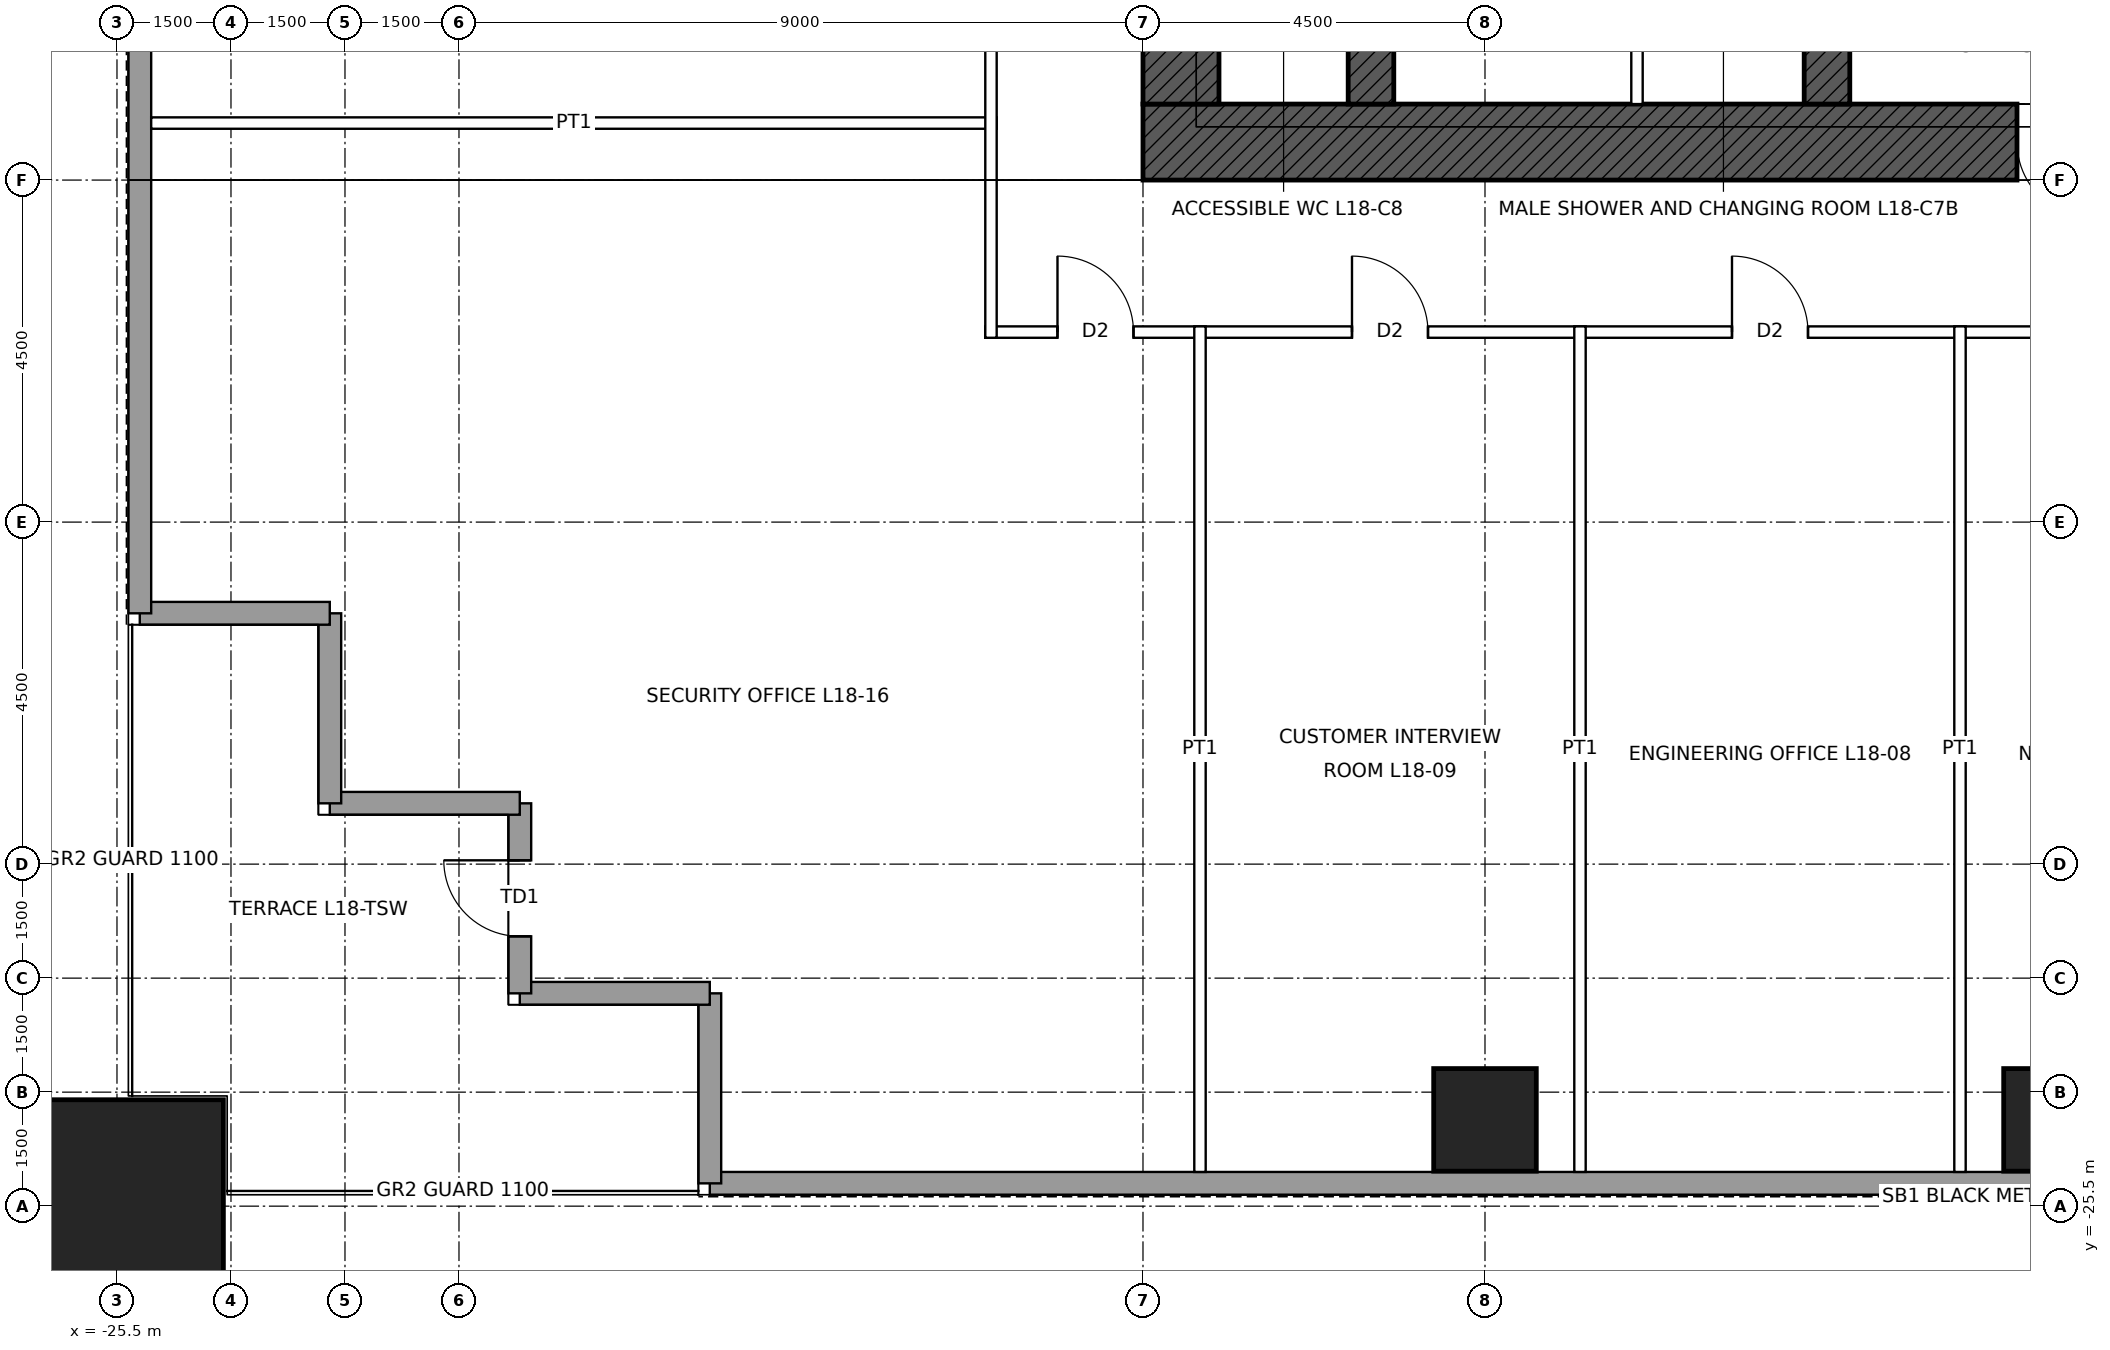
"""IFC4 building model, lengths in metres.
Left out: names, types, materials, properties, quantities, classifications, styles, units other than length and angle.
Written with IfcOpenShell. Run it as: python <this file> out.ifc"""

import sys

from ifc_helpers import new_model, si_unit, direction, frame, frame_2d, origin, origin_2d, place, context, subcontext, project, spatial, rectangle, hollow_rectangle, extrude, element, fill, save


model = new_model("IFC4")
c1 = context("Model", 3, precision=1e-05, world=origin(), true_north=direction((0.0, 1.0)))
c2 = subcontext(c1, "Body", "Model", "MODEL_VIEW")
j1 = project(units=[si_unit("LENGTHUNIT", "METRE"), si_unit("PLANEANGLEUNIT", "RADIAN")], contexts=[c1])
p1 = place(None, origin())
s1 = spatial("IfcSite", under=j1, at=p1, CompositionType="ELEMENT")
p2 = place(p1, origin())
s2 = spatial("IfcBuilding", under=s1, at=p2, CompositionType="ELEMENT")
p3 = place(p2, frame((0.0, 0.0, 93.4)))
s3 = spatial("IfcBuildingStorey", under=s2, at=p3, CompositionType="ELEMENT", Elevation=93.4)
p4 = place(p3, frame((-25.5, -25.5, 0.0), z_axis=(0.0, 0.0, 1.0), x_axis=(1.0, 0.0, 0.0)))
e1 = element("IfcColumn", 1, at=p4, inside=s3, PredefinedType="COLUMN", context=c2, shape_type="SweptSolid", body=[
    extrude(hollow_rectangle(XDim=2.8, YDim=2.8, WallThickness=0.14, at=origin_2d()), origin(), (0.0, 0.0, 1.0), 5.0),
])
for number, where, z_axis, x_axis in (
    (2, (0.0, -24.365, 0.0), (0.0, 0.0, 1.0), (1.0, 0.0, 0.0)),
    (3, (-7.5, -24.365, 0.0), (0.0, 0.0, 1.0), (1.0, 0.0, 0.0)),
):
    element("IfcColumn", number, at=place(p3, frame(where, z_axis=z_axis, x_axis=x_axis)), inside=s3, PredefinedType="COLUMN", context=c2, shape_type="SweptSolid", body=[
        extrude(hollow_rectangle(XDim=1.35, YDim=1.35, WallThickness=0.1, at=origin_2d()), origin(), (0.0, 0.0, 1.0), 5.0),
    ])
p5 = place(p3, frame((12.0, -11.5, 0.0), z_axis=(0.0, 0.0, 1.0), x_axis=(-1.0, 0.0, 0.0)))
e4 = element("IfcWall", 4, at=p5, inside=s3, PredefinedType="SHEAR", context=c2, shape_type="SweptSolid", body=[
    extrude(rectangle(XDim=24.0, YDim=1.0, at=frame_2d((12.0, 0.0))), origin(), (0.0, 0.0, 1.0), 5.0),
])
p6 = place(p5, frame((11.5, 0.0, 0.0)))
e5 = element("IfcOpeningElement", 5, at=p6, cuts=e4, PredefinedType="OPENING", context=c2, shape_type="SweptSolid", body=[
    extrude(rectangle(XDim=1.0, YDim=2.1, at=frame_2d((0.5, 1.05))), frame((0.0, 0.51, 0.0), z_axis=(0.0, -1.0, 0.0), x_axis=(1.0, 0.0, 0.0)), (0.0, 0.0, 1.0), 1.02),
])
p7 = place(p5, frame((1.0, 0.0, 0.0)))
e6 = element("IfcOpeningElement", 6, at=p7, cuts=e4, PredefinedType="OPENING", context=c2, shape_type="SweptSolid", body=[
    extrude(rectangle(XDim=1.0, YDim=2.4, at=frame_2d((0.5, 1.2))), frame((0.0, 0.51, 0.0), z_axis=(0.0, -1.0, 0.0), x_axis=(1.0, 0.0, 0.0)), (0.0, 0.0, 1.0), 1.02),
])
p8 = place(p3, frame((-11.5, -11.0, 0.0), z_axis=(0.0, 0.0, 1.0), x_axis=(0.0, 1.0, 0.0)))
e7 = element("IfcWall", 7, at=p8, inside=s3, PredefinedType="SHEAR", context=c2, shape_type="SweptSolid", body=[
    extrude(rectangle(XDim=22.0, YDim=1.0, at=frame_2d((11.0, 0.0))), origin(), (0.0, 0.0, 1.0), 5.0),
])
p9 = place(p8, frame((10.5, 0.0, 0.0)))
e8 = element("IfcOpeningElement", 8, at=p9, cuts=e7, PredefinedType="OPENING", context=c2, shape_type="SweptSolid", body=[
    extrude(rectangle(XDim=1.0, YDim=2.4, at=frame_2d((0.5, 1.2))), frame((0.0, 0.51, 0.0), z_axis=(0.0, -1.0, 0.0), x_axis=(1.0, 0.0, 0.0)), (0.0, 0.0, 1.0), 1.02),
])
p10 = place(p3, frame((-9.0, -11.0, 0.0), z_axis=(0.0, 0.0, 1.0), x_axis=(0.0, 1.0, 0.0)))
e9 = element("IfcWall", 9, at=p10, inside=s3, PredefinedType="SHEAR", context=c2, shape_type="SweptSolid", body=[
    extrude(rectangle(XDim=6.5, YDim=0.6, at=frame_2d((3.25, 0.0))), origin(), (0.0, 0.0, 1.0), 5.0),
])
p11 = place(p10, frame((4.25, 0.0, 0.0)))
e10 = element("IfcOpeningElement", 10, at=p11, cuts=e9, PredefinedType="OPENING", context=c2, shape_type="SweptSolid", body=[
    extrude(rectangle(XDim=1.0, YDim=2.1, at=frame_2d((0.5, 1.05))), frame((0.0, 0.31, 0.0), z_axis=(0.0, -1.0, 0.0), x_axis=(1.0, 0.0, 0.0)), (0.0, 0.0, 1.0), 0.62),
])
p12 = place(p3, frame((-3.0, -11.0, 0.0), z_axis=(0.0, 0.0, 1.0), x_axis=(0.0, 1.0, 0.0)))
e11 = element("IfcWall", 11, at=p12, inside=s3, PredefinedType="SHEAR", context=c2, shape_type="SweptSolid", body=[
    extrude(rectangle(XDim=6.5, YDim=0.6, at=frame_2d((3.25, 0.0))), origin(), (0.0, 0.0, 1.0), 5.0),
])
p13 = place(p3, frame((17.7, -25.2, 0.0), z_axis=(0.0, 0.0, 1.0), x_axis=(-1.0, 0.0, 0.0)))
e12 = element("IfcWall", 12, at=p13, inside=s3, PredefinedType="SOLIDWALL", context=c2, shape_type="SweptSolid", body=[
    extrude(rectangle(XDim=35.4, YDim=0.3, at=frame_2d((17.7, 0.0))), origin(), (0.0, 0.0, 1.0), 4.75),
])
for number, where, z_axis, x_axis in (
    (13, (-17.7, -25.2, 0.0), (0.0, 0.0, 1.0), (0.0, 1.0, 0.0)),
    (14, (-17.7, -22.7, 0.0), (0.0, 0.0, 1.0), (-1.0, 0.0, 0.0)),
):
    element("IfcWall", number, at=place(p3, frame(where, z_axis=z_axis, x_axis=x_axis)), inside=s3, PredefinedType="SOLIDWALL", context=c2, shape_type="SweptSolid", body=[
        extrude(rectangle(XDim=2.5, YDim=0.3, at=frame_2d((1.25, 0.0))), origin(), (0.0, 0.0, 1.0), 4.75),
    ])
p14 = place(p3, frame((-20.2, -22.7, 0.0), z_axis=(0.0, 0.0, 1.0), x_axis=(0.0, 1.0, 0.0)))
e15 = element("IfcWall", 15, at=p14, inside=s3, PredefinedType="SOLIDWALL", context=c2, shape_type="SweptSolid", body=[
    extrude(rectangle(XDim=2.5, YDim=0.3, at=frame_2d((1.25, 0.0))), origin(), (0.0, 0.0, 1.0), 4.75),
])
p15 = place(p14, frame((0.75, 0.0, 0.0)))
e16 = element("IfcOpeningElement", 16, at=p15, cuts=e15, PredefinedType="OPENING", context=c2, shape_type="SweptSolid", body=[
    extrude(rectangle(XDim=1.0, YDim=2.4, at=frame_2d((0.5, 1.2))), frame((0.0, 0.16, 0.0), z_axis=(0.0, -1.0, 0.0), x_axis=(1.0, 0.0, 0.0)), (0.0, 0.0, 1.0), 0.32),
])
for number, where, z_axis, x_axis in (
    (17, (-20.2, -20.2, 0.0), (0.0, 0.0, 1.0), (-1.0, 0.0, 0.0)),
    (18, (-22.7, -20.2, 0.0), (0.0, 0.0, 1.0), (0.0, 1.0, 0.0)),
    (19, (-22.7, -17.7, 0.0), (0.0, 0.0, 1.0), (-1.0, 0.0, 0.0)),
):
    element("IfcWall", number, at=place(p3, frame(where, z_axis=z_axis, x_axis=x_axis)), inside=s3, PredefinedType="SOLIDWALL", context=c2, shape_type="SweptSolid", body=[
        extrude(rectangle(XDim=2.5, YDim=0.3, at=frame_2d((1.25, 0.0))), origin(), (0.0, 0.0, 1.0), 4.75),
    ])
p16 = place(p3, frame((-25.2, -17.7, 0.0), z_axis=(0.0, 0.0, 1.0), x_axis=(0.0, 1.0, 0.0)))
e20 = element("IfcWall", 20, at=p16, inside=s3, PredefinedType="SOLIDWALL", context=c2, shape_type="SweptSolid", body=[
    extrude(rectangle(XDim=35.4, YDim=0.3, at=frame_2d((17.7, 0.0))), origin(), (0.0, 0.0, 1.0), 4.75),
])
p17 = place(p3, frame((-14.075, -14.0, 0.0), z_axis=(0.0, 0.0, 1.0), x_axis=(1.0, 0.0, 0.0)))
e21 = element("IfcWall", 21, at=p17, inside=s3, PredefinedType="PARTITIONING", context=c2, shape_type="SweptSolid", body=[
    extrude(rectangle(XDim=28.15, YDim=0.15, at=frame_2d((14.075, 0.0))), origin(), (0.0, 0.0, 1.0), 4.75),
])
p18 = place(p17, frame((21.3, 0.0, 0.0)))
e22 = element("IfcOpeningElement", 22, at=p18, cuts=e21, PredefinedType="OPENING", context=c2, shape_type="SweptSolid", body=[
    extrude(rectangle(XDim=1.8, YDim=2.4, at=frame_2d((0.9, 1.2))), frame((0.0, 0.085, 0.0), z_axis=(0.0, -1.0, 0.0), x_axis=(1.0, 0.0, 0.0)), (0.0, 0.0, 1.0), 0.17),
])
p19 = place(p17, frame((15.05, 0.0, 0.0)))
e23 = element("IfcOpeningElement", 23, at=p19, cuts=e21, PredefinedType="OPENING", context=c2, shape_type="SweptSolid", body=[
    extrude(rectangle(XDim=1.8, YDim=2.4, at=frame_2d((0.9, 1.2))), frame((0.0, 0.085, 0.0), z_axis=(0.0, -1.0, 0.0), x_axis=(1.0, 0.0, 0.0)), (0.0, 0.0, 1.0), 0.17),
])
p20 = place(p17, frame((9.825, 0.0, 0.0)))
e24 = element("IfcOpeningElement", 24, at=p20, cuts=e21, PredefinedType="OPENING", context=c2, shape_type="SweptSolid", body=[
    extrude(rectangle(XDim=1.0, YDim=2.1, at=frame_2d((0.5, 1.05))), frame((0.0, 0.085, 0.0), z_axis=(0.0, -1.0, 0.0), x_axis=(1.0, 0.0, 0.0)), (0.0, 0.0, 1.0), 0.17),
])
p21 = place(p17, frame((4.825, 0.0, 0.0)))
e25 = element("IfcOpeningElement", 25, at=p21, cuts=e21, PredefinedType="OPENING", context=c2, shape_type="SweptSolid", body=[
    extrude(rectangle(XDim=1.0, YDim=2.1, at=frame_2d((0.5, 1.05))), frame((0.0, 0.085, 0.0), z_axis=(0.0, -1.0, 0.0), x_axis=(1.0, 0.0, 0.0)), (0.0, 0.0, 1.0), 0.17),
])
p22 = place(p17, frame((26.2, 0.0, 0.0)))
e26 = element("IfcOpeningElement", 26, at=p22, cuts=e21, PredefinedType="OPENING", context=c2, shape_type="SweptSolid", body=[
    extrude(rectangle(XDim=1.0, YDim=2.1, at=frame_2d((0.5, 1.05))), frame((0.0, 0.085, 0.0), z_axis=(0.0, -1.0, 0.0), x_axis=(1.0, 0.0, 0.0)), (0.0, 0.0, 1.0), 0.17),
])
p23 = place(p17, frame((0.95, 0.0, 0.0)))
e27 = element("IfcOpeningElement", 27, at=p23, cuts=e21, PredefinedType="OPENING", context=c2, shape_type="SweptSolid", body=[
    extrude(rectangle(XDim=1.0, YDim=2.1, at=frame_2d((0.5, 1.05))), frame((0.0, 0.085, 0.0), z_axis=(0.0, -1.0, 0.0), x_axis=(1.0, 0.0, 0.0)), (0.0, 0.0, 1.0), 0.17),
])
p24 = place(p3, frame((-25.05, -11.25, 0.0), z_axis=(0.0, 0.0, 1.0), x_axis=(1.0, 0.0, 0.0)))
e28 = element("IfcWall", 28, at=p24, inside=s3, PredefinedType="PARTITIONING", context=c2, shape_type="SweptSolid", body=[
    extrude(rectangle(XDim=11.125, YDim=0.15, at=frame_2d((5.562, 0.0))), origin(), (0.0, 0.0, 1.0), 3.823),
])
p25 = place(p3, frame((-14.0, -14.075, 0.0), z_axis=(0.0, 0.0, 1.0), x_axis=(0.0, 1.0, 0.0)))
e29 = element("IfcWall", 29, at=p25, inside=s3, PredefinedType="PARTITIONING", context=c2, shape_type="SweptSolid", body=[
    extrude(rectangle(XDim=28.15, YDim=0.15, at=frame_2d((14.075, 0.0))), origin(), (0.0, 0.0, 1.0), 4.75),
])
p26 = place(p25, frame((5.05, 0.0, 0.0)))
e30 = element("IfcOpeningElement", 30, at=p26, cuts=e29, PredefinedType="OPENING", context=c2, shape_type="SweptSolid", body=[
    extrude(rectangle(XDim=1.8, YDim=2.4, at=frame_2d((0.9, 1.2))), frame((0.0, 0.085, 0.0), z_axis=(0.0, -1.0, 0.0), x_axis=(1.0, 0.0, 0.0)), (0.0, 0.0, 1.0), 0.17),
])
p27 = place(p25, frame((10.45, 0.0, 0.0)))
e31 = element("IfcOpeningElement", 31, at=p27, cuts=e29, PredefinedType="OPENING", context=c2, shape_type="SweptSolid", body=[
    extrude(rectangle(XDim=1.0, YDim=2.1, at=frame_2d((0.5, 1.05))), frame((0.0, 0.085, 0.0), z_axis=(0.0, -1.0, 0.0), x_axis=(1.0, 0.0, 0.0)), (0.0, 0.0, 1.0), 0.17),
])
p28 = place(p25, frame((15.465, 0.0, 0.0)))
e32 = element("IfcOpeningElement", 32, at=p28, cuts=e29, PredefinedType="OPENING", context=c2, shape_type="SweptSolid", body=[
    extrude(rectangle(XDim=1.0, YDim=2.1, at=frame_2d((0.5, 1.05))), frame((0.0, 0.085, 0.0), z_axis=(0.0, -1.0, 0.0), x_axis=(1.0, 0.0, 0.0)), (0.0, 0.0, 1.0), 0.17),
])
p29 = place(p25, frame((21.075, 0.0, 0.0)))
e33 = element("IfcOpeningElement", 33, at=p29, cuts=e29, PredefinedType="OPENING", context=c2, shape_type="SweptSolid", body=[
    extrude(rectangle(XDim=1.0, YDim=2.1, at=frame_2d((0.5, 1.05))), frame((0.0, 0.085, 0.0), z_axis=(0.0, -1.0, 0.0), x_axis=(1.0, 0.0, 0.0)), (0.0, 0.0, 1.0), 0.17),
])
p30 = place(p3, frame((-11.25, -25.05, 0.0), z_axis=(0.0, 0.0, 1.0), x_axis=(0.0, 1.0, 0.0)))
e34 = element("IfcWall", 34, at=p30, inside=s3, PredefinedType="PARTITIONING", context=c2, shape_type="SweptSolid", body=[
    extrude(rectangle(XDim=11.125, YDim=0.15, at=frame_2d((5.562, 0.0))), origin(), (0.0, 0.0, 1.0), 3.823),
])
for number, where, z_axis, x_axis in (
    (35, (-6.25, -25.05, 0.0), (0.0, 0.0, 1.0), (0.0, 1.0, 0.0)),
    (36, (-1.25, -25.05, 0.0), (0.0, 0.0, 1.0), (0.0, 1.0, 0.0)),
):
    element("IfcWall", number, at=place(p3, frame(where, z_axis=z_axis, x_axis=x_axis)), inside=s3, PredefinedType="PARTITIONING", context=c2, shape_type="SweptSolid", body=[
        extrude(rectangle(XDim=11.125, YDim=0.15, at=frame_2d((5.562, 0.0))), origin(), (0.0, 0.0, 1.0), 4.75),
    ])
p31 = place(p3, frame((-5.5, -11.0, 0.0), z_axis=(0.0, 0.0, 1.0), x_axis=(0.0, 1.0, 0.0)))
e37 = element("IfcWall", 37, at=p31, inside=s3, PredefinedType="PARTITIONING", context=c2, shape_type="SweptSolid", body=[
    extrude(rectangle(XDim=6.2, YDim=0.15, at=frame_2d((3.1, 0.0))), origin(), (0.0, 0.0, 1.0), 4.75),
])
p32 = place(p31, frame((2.6, 0.0, 0.0)))
e38 = element("IfcOpeningElement", 38, at=p32, cuts=e37, PredefinedType="OPENING", context=c2, shape_type="SweptSolid", body=[
    extrude(rectangle(XDim=1.0, YDim=2.1, at=frame_2d((0.5, 1.05))), frame((0.0, 0.085, 0.0), z_axis=(0.0, -1.0, 0.0), x_axis=(1.0, 0.0, 0.0)), (0.0, 0.0, 1.0), 0.17),
])
p33 = place(p15, origin())
e39 = element("IfcDoor", 39, at=p33, inside=s3, OperationType="SINGLE_SWING_RIGHT", PredefinedType="DOOR", context=c2, shape_type="SweptSolid", body=[
    extrude(rectangle(XDim=1.0, YDim=2.4, at=frame_2d((0.5, 1.2))), frame((0.0, 0.025, 0.0), z_axis=(0.0, -1.0, 0.0), x_axis=(1.0, 0.0, 0.0)), (0.0, 0.0, 1.0), 0.05),
])
fill(e16, e39)
p34 = place(p6, origin())
e40 = element("IfcDoor", 40, at=p34, inside=s3, OperationType="SINGLE_SWING_LEFT", PredefinedType="DOOR", context=c2, shape_type="SweptSolid", body=[
    extrude(rectangle(XDim=1.0, YDim=2.1, at=frame_2d((0.5, 1.05))), frame((0.0, 0.485, 0.0), z_axis=(0.0, -1.0, 0.0), x_axis=(1.0, 0.0, 0.0)), (0.0, 0.0, 1.0), 0.05),
])
fill(e5, e40)
p35 = place(p20, origin())
e41 = element("IfcDoor", 41, at=p35, inside=s3, OperationType="SINGLE_SWING_LEFT", PredefinedType="DOOR", context=c2, shape_type="SweptSolid", body=[
    extrude(rectangle(XDim=1.0, YDim=2.1, at=frame_2d((0.5, 1.05))), frame((0.0, 0.025, 0.0), z_axis=(0.0, -1.0, 0.0), x_axis=(1.0, 0.0, 0.0)), (0.0, 0.0, 1.0), 0.05),
])
fill(e24, e41)
p36 = place(p21, origin())
e42 = element("IfcDoor", 42, at=p36, inside=s3, OperationType="SINGLE_SWING_LEFT", PredefinedType="DOOR", context=c2, shape_type="SweptSolid", body=[
    extrude(rectangle(XDim=1.0, YDim=2.1, at=frame_2d((0.5, 1.05))), frame((0.0, 0.025, 0.0), z_axis=(0.0, -1.0, 0.0), x_axis=(1.0, 0.0, 0.0)), (0.0, 0.0, 1.0), 0.05),
])
fill(e25, e42)
p37 = place(p23, origin())
e43 = element("IfcDoor", 43, at=p37, inside=s3, OperationType="SINGLE_SWING_LEFT", PredefinedType="DOOR", context=c2, shape_type="SweptSolid", body=[
    extrude(rectangle(XDim=1.0, YDim=2.1, at=frame_2d((0.5, 1.05))), frame((0.0, 0.025, 0.0), z_axis=(0.0, -1.0, 0.0), x_axis=(1.0, 0.0, 0.0)), (0.0, 0.0, 1.0), 0.05),
])
fill(e27, e43)
save(model, sys.argv[1])
